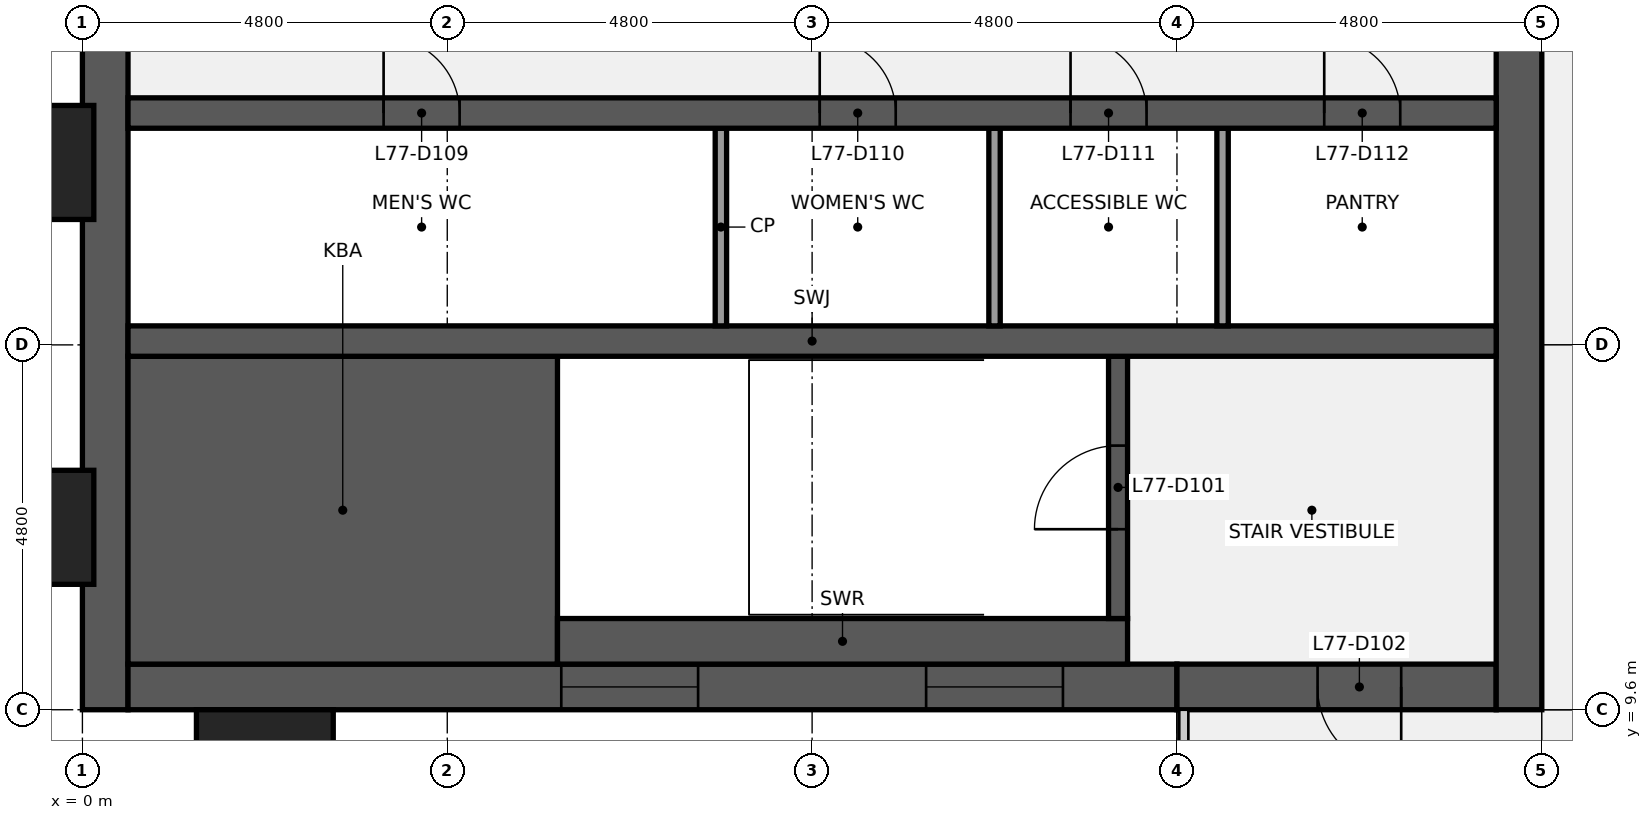
"""IFC4 building model, lengths in metres.
Left out: names, types, materials, properties, quantities, classifications, styles, units other than length and angle.
Written with IfcOpenShell. Run it as: python <this file> out.ifc"""

import sys

from ifc_helpers import new_model, si_unit, direction, frame, frame_2d, origin, origin_2d, place, context, subcontext, project, spatial, rectangle, extrude, element, fill, save


model = new_model("IFC4")
c1 = context("Model", 3, precision=1e-05, world=origin(), true_north=direction((0.0, 1.0)))
c2 = subcontext(c1, "Body", "Model", "MODEL_VIEW")
j1 = project(units=[si_unit("LENGTHUNIT", "METRE"), si_unit("PLANEANGLEUNIT", "RADIAN")], contexts=[c1])
p1 = place(None, origin())
s1 = spatial("IfcSite", under=j1, at=p1, CompositionType="ELEMENT")
p2 = place(p1, origin())
s2 = spatial("IfcBuilding", under=s1, at=p2, CompositionType="ELEMENT")
p3 = place(p2, frame((0.0, 0.0, 346.3)))
s3 = spatial("IfcBuildingStorey", under=s2, at=p3, CompositionType="ELEMENT", Elevation=346.3)
p4 = place(p3, frame((0.3, 9.6, 0.0), z_axis=(0.0, 0.0, 1.0), x_axis=(0.0, 1.0, 0.0)))
e1 = element("IfcWall", 1, at=p4, inside=s3, PredefinedType="SHEAR", context=c2, shape_type="SweptSolid", body=[
    extrude(rectangle(XDim=28.8, YDim=0.6, at=frame_2d((14.4, 0.0))), origin(), (0.0, 0.0, 1.0), 3.84),
])
p5 = place(p4, frame((8.85, 0.0, 0.9)))
e2 = element("IfcOpeningElement", 2, at=p5, cuts=e1, PredefinedType="OPENING", context=c2, shape_type="SweptSolid", body=[
    extrude(rectangle(XDim=1.5, YDim=1.5, at=frame_2d((0.75, 0.75))), frame((0.0, 0.31, 0.0), z_axis=(0.0, -1.0, 0.0), x_axis=(1.0, 0.0, 0.0)), (0.0, 0.0, 1.0), 0.62),
])
p6 = place(p4, frame((18.45, 0.0, 0.9)))
e3 = element("IfcOpeningElement", 3, at=p6, cuts=e1, PredefinedType="OPENING", context=c2, shape_type="SweptSolid", body=[
    extrude(rectangle(XDim=1.5, YDim=1.5, at=frame_2d((0.75, 0.75))), frame((0.0, 0.31, 0.0), z_axis=(0.0, -1.0, 0.0), x_axis=(1.0, 0.0, 0.0)), (0.0, 0.0, 1.0), 0.62),
])
p7 = place(p3, frame((14.4, 9.9, 0.0), z_axis=(0.0, 0.0, 1.0), x_axis=(-1.0, 0.0, 0.0)))
e4 = element("IfcWall", 4, at=p7, inside=s3, PredefinedType="SHEAR", context=c2, shape_type="SweptSolid", body=[
    extrude(rectangle(XDim=13.8, YDim=0.6, at=frame_2d((6.9, 0.0))), origin(), (0.0, 0.0, 1.0), 3.84),
])
p8 = place(p7, frame((6.3, 0.0, 0.9)))
e5 = element("IfcOpeningElement", 5, at=p8, cuts=e4, PredefinedType="OPENING", context=c2, shape_type="SweptSolid", body=[
    extrude(rectangle(XDim=1.8, YDim=1.5, at=frame_2d((0.9, 0.75))), frame((0.0, 0.31, 0.0), z_axis=(0.0, -1.0, 0.0), x_axis=(1.0, 0.0, 0.0)), (0.0, 0.0, 1.0), 0.62),
])
p9 = place(p7, frame((1.5, 0.0, 0.9)))
e6 = element("IfcOpeningElement", 6, at=p9, cuts=e4, PredefinedType="OPENING", context=c2, shape_type="SweptSolid", body=[
    extrude(rectangle(XDim=1.8, YDim=1.5, at=frame_2d((0.9, 0.75))), frame((0.0, 0.31, 0.0), z_axis=(0.0, -1.0, 0.0), x_axis=(1.0, 0.0, 0.0)), (0.0, 0.0, 1.0), 0.62),
])
p10 = place(p3, frame((18.6, 9.9, 0.0), z_axis=(0.0, 0.0, 1.0), x_axis=(-1.0, 0.0, 0.0)))
e7 = element("IfcWall", 7, at=p10, inside=s3, PredefinedType="SHEAR", context=c2, shape_type="SweptSolid", body=[
    extrude(rectangle(XDim=4.2, YDim=0.6, at=frame_2d((2.1, 0.0))), origin(), (0.0, 0.0, 1.0), 3.84),
])
p11 = place(p10, frame((1.25, 0.0, 0.0)))
e8 = element("IfcOpeningElement", 8, at=p11, cuts=e7, PredefinedType="OPENING", context=c2, shape_type="SweptSolid", body=[
    extrude(rectangle(XDim=1.1, YDim=2.1, at=frame_2d((0.55, 1.05))), frame((0.0, 0.31, 0.0), z_axis=(0.0, -1.0, 0.0), x_axis=(1.0, 0.0, 0.0)), (0.0, 0.0, 1.0), 0.62),
])
p12 = place(p3, frame((18.9, 38.4, 0.0), z_axis=(0.0, 0.0, 1.0), x_axis=(0.0, -1.0, 0.0)))
e9 = element("IfcWall", 9, at=p12, inside=s3, PredefinedType="SHEAR", context=c2, shape_type="SweptSolid", body=[
    extrude(rectangle(XDim=28.8, YDim=0.6, at=frame_2d((14.4, 0.0))), origin(), (0.0, 0.0, 1.0), 3.84),
])
p13 = place(p12, frame((18.3, 0.0, 0.0)))
e10 = element("IfcOpeningElement", 10, at=p13, cuts=e9, PredefinedType="OPENING", context=c2, shape_type="SweptSolid", body=[
    extrude(rectangle(XDim=1.8, YDim=2.1, at=frame_2d((0.9, 1.05))), frame((0.0, 0.31, 0.0), z_axis=(0.0, -1.0, 0.0), x_axis=(1.0, 0.0, 0.0)), (0.0, 0.0, 1.0), 0.62),
])
p14 = place(p12, frame((8.7, 0.0, 0.0)))
e11 = element("IfcOpeningElement", 11, at=p14, cuts=e9, PredefinedType="OPENING", context=c2, shape_type="SweptSolid", body=[
    extrude(rectangle(XDim=1.8, YDim=2.1, at=frame_2d((0.9, 1.05))), frame((0.0, 0.31, 0.0), z_axis=(0.0, -1.0, 0.0), x_axis=(1.0, 0.0, 0.0)), (0.0, 0.0, 1.0), 0.62),
])
p15 = place(p3, frame((0.6, 12.225, 0.0), z_axis=(0.0, 0.0, 1.0), x_axis=(1.0, 0.0, 0.0)))
e12 = element("IfcWall", 12, at=p15, inside=s3, PredefinedType="SHEAR", context=c2, shape_type="SweptSolid", body=[
    extrude(rectangle(XDim=5.65, YDim=4.05, at=frame_2d((2.825, 0.0))), origin(), (0.0, 0.0, 1.0), 3.84),
])
p16 = place(p3, frame((6.25, 10.5, 0.0), z_axis=(0.0, 0.0, 1.0), x_axis=(1.0, 0.0, 0.0)))
e13 = element("IfcWall", 13, at=p16, inside=s3, PredefinedType="SHEAR", context=c2, shape_type="SweptSolid", body=[
    extrude(rectangle(XDim=7.5, YDim=0.6, at=frame_2d((3.75, 0.0))), origin(), (0.0, 0.0, 1.0), 3.84),
])
p17 = place(p3, frame((13.625, 10.8, 0.0), z_axis=(0.0, 0.0, 1.0), x_axis=(0.0, 1.0, 0.0)))
e14 = element("IfcWall", 14, at=p17, inside=s3, PredefinedType="SHEAR", context=c2, shape_type="SweptSolid", body=[
    extrude(rectangle(XDim=3.45, YDim=0.25, at=frame_2d((1.725, 0.0))), origin(), (0.0, 0.0, 1.0), 3.84),
])
p18 = place(p17, frame((1.175, 0.0, 0.0)))
e15 = element("IfcOpeningElement", 15, at=p18, cuts=e14, PredefinedType="OPENING", context=c2, shape_type="SweptSolid", body=[
    extrude(rectangle(XDim=1.1, YDim=2.1, at=frame_2d((0.55, 1.05))), frame((0.0, 0.135, 0.0), z_axis=(0.0, -1.0, 0.0), x_axis=(1.0, 0.0, 0.0)), (0.0, 0.0, 1.0), 0.27),
])
p19 = place(p3, frame((0.6, 14.45, 0.0), z_axis=(0.0, 0.0, 1.0), x_axis=(1.0, 0.0, 0.0)))
e16 = element("IfcWall", 16, at=p19, inside=s3, PredefinedType="SHEAR", context=c2, shape_type="SweptSolid", body=[
    extrude(rectangle(XDim=18.0, YDim=0.4, at=frame_2d((9.0, 0.0))), origin(), (0.0, 0.0, 1.0), 3.84),
])
for number, where, z_axis, x_axis in (
    (17, (8.4, 14.65, 0.0), (0.0, 0.0, 1.0), (0.0, 1.0, 0.0)),
    (18, (12.0, 14.65, 0.0), (0.0, 0.0, 1.0), (0.0, 1.0, 0.0)),
    (19, (15.0, 14.65, 0.0), (0.0, 0.0, 1.0), (0.0, 1.0, 0.0)),
):
    element("IfcWall", number, at=place(p3, frame(where, z_axis=z_axis, x_axis=x_axis)), inside=s3, PredefinedType="PARTITIONING", context=c2, shape_type="SweptSolid", body=[
        extrude(rectangle(XDim=2.6, YDim=0.15, at=frame_2d((1.3, 0.0))), origin(), (0.0, 0.0, 1.0), 3.84),
    ])
p20 = place(p3, frame((0.6, 17.45, 0.0), z_axis=(0.0, 0.0, 1.0), x_axis=(1.0, 0.0, 0.0)))
e20 = element("IfcWall", 20, at=p20, inside=s3, PredefinedType="SHEAR", context=c2, shape_type="SweptSolid", body=[
    extrude(rectangle(XDim=18.0, YDim=0.4, at=frame_2d((9.0, 0.0))), origin(), (0.0, 0.0, 1.0), 3.84),
])
p21 = place(p20, frame((3.363, 0.0, 0.0)))
e21 = element("IfcOpeningElement", 21, at=p21, cuts=e20, PredefinedType="OPENING", context=c2, shape_type="SweptSolid", body=[
    extrude(rectangle(XDim=1.0, YDim=2.1, at=frame_2d((0.5, 1.05))), frame((0.0, 0.21, 0.0), z_axis=(0.0, -1.0, 0.0), x_axis=(1.0, 0.0, 0.0)), (0.0, 0.0, 1.0), 0.42),
])
p22 = place(p20, frame((9.1, 0.0, 0.0)))
e22 = element("IfcOpeningElement", 22, at=p22, cuts=e20, PredefinedType="OPENING", context=c2, shape_type="SweptSolid", body=[
    extrude(rectangle(XDim=1.0, YDim=2.1, at=frame_2d((0.5, 1.05))), frame((0.0, 0.21, 0.0), z_axis=(0.0, -1.0, 0.0), x_axis=(1.0, 0.0, 0.0)), (0.0, 0.0, 1.0), 0.42),
])
p23 = place(p20, frame((12.4, 0.0, 0.0)))
e23 = element("IfcOpeningElement", 23, at=p23, cuts=e20, PredefinedType="OPENING", context=c2, shape_type="SweptSolid", body=[
    extrude(rectangle(XDim=1.0, YDim=2.1, at=frame_2d((0.5, 1.05))), frame((0.0, 0.21, 0.0), z_axis=(0.0, -1.0, 0.0), x_axis=(1.0, 0.0, 0.0)), (0.0, 0.0, 1.0), 0.42),
])
p24 = place(p20, frame((15.738, 0.0, 0.0)))
e24 = element("IfcOpeningElement", 24, at=p24, cuts=e20, PredefinedType="OPENING", context=c2, shape_type="SweptSolid", body=[
    extrude(rectangle(XDim=1.0, YDim=2.1, at=frame_2d((0.5, 1.05))), frame((0.0, 0.21, 0.0), z_axis=(0.0, -1.0, 0.0), x_axis=(1.0, 0.0, 0.0)), (0.0, 0.0, 1.0), 0.42),
])
for number, where, z_axis, x_axis in (
    (25, (-0.75, 12.0, 0.0), (0.0, 0.0, 1.0), (0.0, 1.0, 0.0)),
    (26, (-0.75, 16.8, 0.0), (0.0, 0.0, 1.0), (0.0, 1.0, 0.0)),
    (27, (2.4, 8.85, 0.0), (0.0, 0.0, 1.0), (1.0, 0.0, 0.0)),
):
    element("IfcColumn", number, at=place(p3, frame(where, z_axis=z_axis, x_axis=x_axis)), inside=s3, PredefinedType="PILASTER", context=c2, shape_type="SweptSolid", body=[
        extrude(rectangle(XDim=1.8, YDim=1.5, at=origin_2d()), origin(), (0.0, 0.0, 1.0), 4.0),
    ])
p25 = place(p18, origin())
e28 = element("IfcDoor", 28, at=p25, inside=s3, OperationType="SINGLE_SWING_LEFT", PredefinedType="DOOR", context=c2, shape_type="SweptSolid", body=[
    extrude(rectangle(XDim=1.1, YDim=2.1, at=frame_2d((0.55, 1.05))), frame((0.0, 0.025, 0.0), z_axis=(0.0, -1.0, 0.0), x_axis=(1.0, 0.0, 0.0)), (0.0, 0.0, 1.0), 0.05),
])
fill(e15, e28)
p26 = place(p11, origin())
e29 = element("IfcDoor", 29, at=p26, inside=s3, OperationType="SINGLE_SWING_LEFT", PredefinedType="DOOR", context=c2, shape_type="SweptSolid", body=[
    extrude(rectangle(XDim=1.1, YDim=2.1, at=frame_2d((0.55, 1.05))), frame((0.0, 0.025, 0.0), z_axis=(0.0, -1.0, 0.0), x_axis=(1.0, 0.0, 0.0)), (0.0, 0.0, 1.0), 0.05),
])
fill(e8, e29)
p27 = place(p21, origin())
e30 = element("IfcDoor", 30, at=p27, inside=s3, OperationType="SINGLE_SWING_LEFT", PredefinedType="DOOR", context=c2, shape_type="SweptSolid", body=[
    extrude(rectangle(XDim=1.0, YDim=2.1, at=frame_2d((0.5, 1.05))), frame((0.0, 0.025, 0.0), z_axis=(0.0, -1.0, 0.0), x_axis=(1.0, 0.0, 0.0)), (0.0, 0.0, 1.0), 0.05),
])
fill(e21, e30)
p28 = place(p22, origin())
e31 = element("IfcDoor", 31, at=p28, inside=s3, OperationType="SINGLE_SWING_LEFT", PredefinedType="DOOR", context=c2, shape_type="SweptSolid", body=[
    extrude(rectangle(XDim=1.0, YDim=2.1, at=frame_2d((0.5, 1.05))), frame((0.0, 0.025, 0.0), z_axis=(0.0, -1.0, 0.0), x_axis=(1.0, 0.0, 0.0)), (0.0, 0.0, 1.0), 0.05),
])
fill(e22, e31)
p29 = place(p23, origin())
e32 = element("IfcDoor", 32, at=p29, inside=s3, OperationType="SINGLE_SWING_LEFT", PredefinedType="DOOR", context=c2, shape_type="SweptSolid", body=[
    extrude(rectangle(XDim=1.0, YDim=2.1, at=frame_2d((0.5, 1.05))), frame((0.0, 0.025, 0.0), z_axis=(0.0, -1.0, 0.0), x_axis=(1.0, 0.0, 0.0)), (0.0, 0.0, 1.0), 0.05),
])
fill(e23, e32)
p30 = place(p24, origin())
e33 = element("IfcDoor", 33, at=p30, inside=s3, OperationType="SINGLE_SWING_LEFT", PredefinedType="DOOR", context=c2, shape_type="SweptSolid", body=[
    extrude(rectangle(XDim=1.0, YDim=2.1, at=frame_2d((0.5, 1.05))), frame((0.0, 0.025, 0.0), z_axis=(0.0, -1.0, 0.0), x_axis=(1.0, 0.0, 0.0)), (0.0, 0.0, 1.0), 0.05),
])
fill(e24, e33)
p31 = place(p8, origin())
e34 = element("IfcWindow", 34, at=p31, inside=s3, PartitioningType="SINGLE_PANEL", PredefinedType="WINDOW", context=c2, shape_type="SweptSolid", body=[
    extrude(rectangle(XDim=1.8, YDim=1.5, at=frame_2d((0.9, 0.75))), frame((0.0, 0.03, 0.0), z_axis=(0.0, -1.0, 0.0), x_axis=(1.0, 0.0, 0.0)), (0.0, 0.0, 1.0), 0.06),
])
fill(e5, e34)
p32 = place(p9, origin())
e35 = element("IfcWindow", 35, at=p32, inside=s3, PartitioningType="SINGLE_PANEL", PredefinedType="WINDOW", context=c2, shape_type="SweptSolid", body=[
    extrude(rectangle(XDim=1.8, YDim=1.5, at=frame_2d((0.9, 0.75))), frame((0.0, 0.03, 0.0), z_axis=(0.0, -1.0, 0.0), x_axis=(1.0, 0.0, 0.0)), (0.0, 0.0, 1.0), 0.06),
])
fill(e6, e35)
save(model, sys.argv[1])
